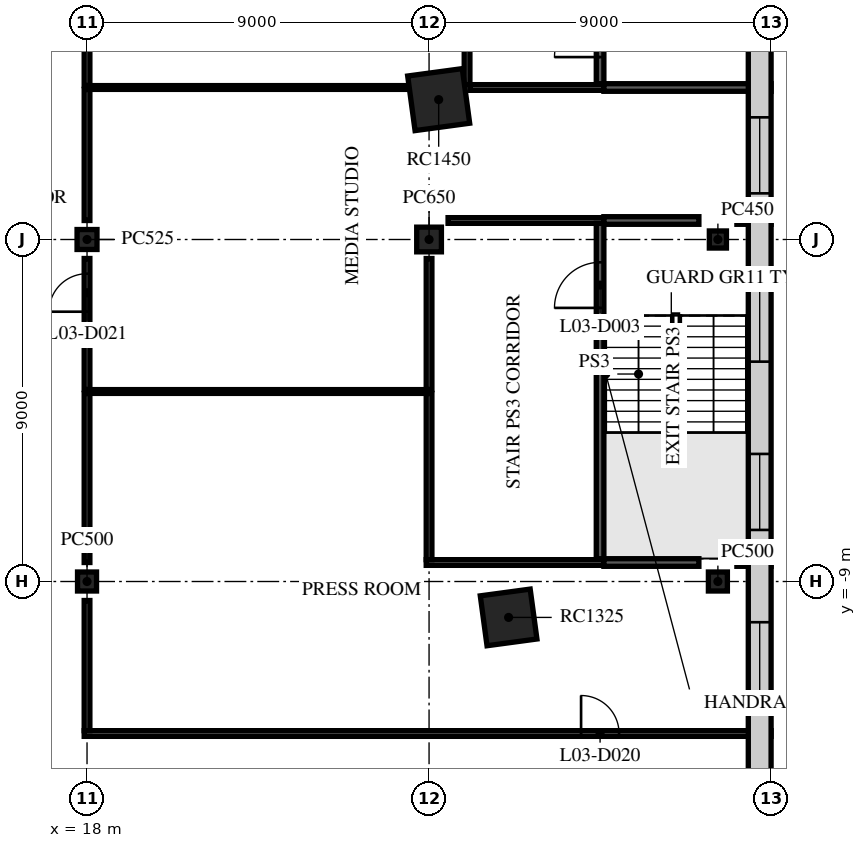
"""IFC4 building model, lengths in metres.
Left out: names, types, materials, properties, quantities, classifications, styles, units other than length and angle.
Written with IfcOpenShell. Run it as: python <this file> out.ifc"""

import sys

from ifc_helpers import new_model, si_unit, direction, frame, frame_2d, origin, origin_2d, place, context, subcontext, project, spatial, rectangle, extrude, element, fill, save


model = new_model("IFC4")
c1 = context("Model", 3, precision=1e-05, world=origin(), true_north=direction((0.0, 1.0)))
c2 = subcontext(c1, "Body", "Model", "MODEL_VIEW")
j1 = project(units=[si_unit("LENGTHUNIT", "METRE"), si_unit("PLANEANGLEUNIT", "RADIAN")], contexts=[c1])
p1 = place(None, origin())
s1 = spatial("IfcSite", under=j1, at=p1, CompositionType="ELEMENT")
p2 = place(p1, origin())
s2 = spatial("IfcBuilding", under=s1, at=p2, CompositionType="ELEMENT")
p3 = place(p2, frame((0.0, 0.0, 13.5)))
s3 = spatial("IfcBuildingStorey", under=s2, at=p3, CompositionType="ELEMENT", Elevation=13.5)
p4 = place(p3, frame((18.0, -9.0, 0.0), z_axis=(0.0, 0.0, 1.0), x_axis=(1.0, 0.0, 0.0)))
e1 = element("IfcColumn", 1, at=p4, inside=s3, PredefinedType="COLUMN", context=c2, shape_type="SweptSolid", body=[
    extrude(rectangle(XDim=0.5, YDim=0.5, at=origin_2d()), origin(), (0.0, 0.0, 1.0), 4.5),
])
p5 = place(p3, frame((18.0, 0.0, 0.0), z_axis=(0.0, 0.0, 1.0), x_axis=(1.0, 0.0, 0.0)))
e2 = element("IfcColumn", 2, at=p5, inside=s3, PredefinedType="COLUMN", context=c2, shape_type="SweptSolid", body=[
    extrude(rectangle(XDim=0.525, YDim=0.525, at=origin_2d()), origin(), (0.0, 0.0, 1.0), 4.5),
])
p6 = place(p3, frame((27.0, 0.0, 0.0), z_axis=(0.0, 0.0, 1.0), x_axis=(1.0, 0.0, 0.0)))
e3 = element("IfcColumn", 3, at=p6, inside=s3, PredefinedType="COLUMN", context=c2, shape_type="SweptSolid", body=[
    extrude(rectangle(XDim=0.65, YDim=0.65, at=origin_2d()), origin(), (0.0, 0.0, 1.0), 4.5),
])
p7 = place(p3, frame((34.6, -9.0, 0.0), z_axis=(0.0, 0.0, 1.0), x_axis=(1.0, 0.0, 0.0)))
e4 = element("IfcColumn", 4, at=p7, inside=s3, PredefinedType="COLUMN", context=c2, shape_type="SweptSolid", body=[
    extrude(rectangle(XDim=0.5, YDim=0.5, at=origin_2d()), origin(), (0.0, 0.0, 1.0), 4.5),
])
p8 = place(p3, frame((34.6, 0.0, 0.0), z_axis=(0.0, 0.0, 1.0), x_axis=(1.0, 0.0, 0.0)))
e5 = element("IfcColumn", 5, at=p8, inside=s3, PredefinedType="COLUMN", context=c2, shape_type="SweptSolid", body=[
    extrude(rectangle(XDim=0.45, YDim=0.45, at=origin_2d()), origin(), (0.0, 0.0, 1.0), 4.5),
])
p9 = place(p3, frame((29.093, -9.945, 0.0), z_axis=(0.0, 0.0, 1.0), x_axis=(0.991001197216, 0.133853005627, 0.0)))
e6 = element("IfcColumn", 6, at=p9, inside=s3, PredefinedType="COLUMN", context=c2, shape_type="SweptSolid", body=[
    extrude(rectangle(XDim=1.325, YDim=1.325, at=origin_2d()), origin(), (0.0, 0.0, 1.0), 4.5),
])
p10 = place(p3, frame((27.253, 3.681, 0.0), z_axis=(0.0, 0.0, 1.0), x_axis=(0.991001197216, 0.133853005627, 0.0)))
e7 = element("IfcColumn", 7, at=p10, inside=s3, PredefinedType="COLUMN", context=c2, shape_type="SweptSolid", body=[
    extrude(rectangle(XDim=1.45, YDim=1.45, at=origin_2d()), origin(), (0.0, 0.0, 1.0), 4.5),
])
p11 = place(p3, frame((17.925, -13.0, 0.0), z_axis=(0.0, 0.0, 1.0), x_axis=(1.0, 0.0, 0.0)))
e8 = element("IfcWall", 8, at=p11, inside=s3, PredefinedType="PARTITIONING", context=c2, shape_type="SweptSolid", body=[
    extrude(rectangle(XDim=18.075, YDim=0.15, at=frame_2d((9.038, 0.0))), origin(), (0.0, 0.0, 1.0), 4.1),
])
p12 = place(p11, frame((13.075, 0.0, 0.0)))
e9 = element("IfcOpeningElement", 9, at=p12, cuts=e8, PredefinedType="OPENING", context=c2, shape_type="SweptSolid", body=[
    extrude(rectangle(XDim=1.0, YDim=2.1, at=frame_2d((0.5, 1.05))), frame((0.0, 0.085, 0.0), z_axis=(0.0, -1.0, 0.0), x_axis=(1.0, 0.0, 0.0)), (0.0, 0.0, 1.0), 0.17),
])
p13 = place(p3, frame((26.925, -8.5, 0.0), z_axis=(0.0, 0.0, 1.0), x_axis=(1.0, 0.0, 0.0)))
e10 = element("IfcWall", 10, at=p13, inside=s3, PredefinedType="PARTITIONING", context=c2, shape_type="SweptSolid", body=[
    extrude(rectangle(XDim=4.675, YDim=0.15, at=frame_2d((2.337, 0.0))), origin(), (0.0, 0.0, 1.0), 4.1),
])
p14 = place(p3, frame((31.6, -8.5, 0.0), z_axis=(0.0, 0.0, 1.0), x_axis=(1.0, 0.0, 0.0)))
e11 = element("IfcWall", 11, at=p14, inside=s3, PredefinedType="PARTITIONING", context=c2, shape_type="SweptSolid", body=[
    extrude(rectangle(XDim=2.5, YDim=0.2, at=frame_2d((1.25, 0.0))), origin(), (0.0, 0.0, 1.0), 4.1),
])
p15 = place(p3, frame((35.1, -8.5, 0.0), z_axis=(0.0, 0.0, 1.0), x_axis=(1.0, 0.0, 0.0)))
e12 = element("IfcWall", 12, at=p15, inside=s3, PredefinedType="PARTITIONING", context=c2, shape_type="SweptSolid", body=[
    extrude(rectangle(XDim=0.9, YDim=0.2, at=frame_2d((0.45, 0.0))), origin(), (0.0, 0.0, 1.0), 4.1),
])
p16 = place(p3, frame((18.075, -4.0, 0.0), z_axis=(0.0, 0.0, 1.0), x_axis=(1.0, 0.0, 0.0)))
e13 = element("IfcWall", 13, at=p16, inside=s3, PredefinedType="PARTITIONING", context=c2, shape_type="SweptSolid", body=[
    extrude(rectangle(XDim=8.85, YDim=0.1, at=frame_2d((4.425, 0.0))), origin(), (0.0, 0.0, 1.0), 4.1),
])
p17 = place(p3, frame((27.5, 0.5, 0.0), z_axis=(0.0, 0.0, 1.0), x_axis=(1.0, 0.0, 0.0)))
e14 = element("IfcWall", 14, at=p17, inside=s3, PredefinedType="PARTITIONING", context=c2, shape_type="SweptSolid", body=[
    extrude(rectangle(XDim=4.1, YDim=0.15, at=frame_2d((2.05, 0.0))), origin(), (0.0, 0.0, 1.0), 4.1),
])
p18 = place(p3, frame((31.6, 0.5, 0.0), z_axis=(0.0, 0.0, 1.0), x_axis=(1.0, 0.0, 0.0)))
e15 = element("IfcWall", 15, at=p18, inside=s3, PredefinedType="PARTITIONING", context=c2, shape_type="SweptSolid", body=[
    extrude(rectangle(XDim=2.5, YDim=0.2, at=frame_2d((1.25, 0.0))), origin(), (0.0, 0.0, 1.0), 4.1),
])
p19 = place(p3, frame((35.1, 0.5, 0.0), z_axis=(0.0, 0.0, 1.0), x_axis=(1.0, 0.0, 0.0)))
e16 = element("IfcWall", 16, at=p19, inside=s3, PredefinedType="PARTITIONING", context=c2, shape_type="SweptSolid", body=[
    extrude(rectangle(XDim=0.9, YDim=0.2, at=frame_2d((0.45, 0.0))), origin(), (0.0, 0.0, 1.0), 4.1),
])
p20 = place(p3, frame((18.075, 4.0, 0.0), z_axis=(0.0, 0.0, 1.0), x_axis=(1.0, 0.0, 0.0)))
e17 = element("IfcWall", 17, at=p20, inside=s3, PredefinedType="PARTITIONING", context=c2, shape_type="SweptSolid", body=[
    extrude(rectangle(XDim=8.447, YDim=0.1, at=frame_2d((4.223, 0.0))), origin(), (0.0, 0.0, 1.0), 4.1),
])
p21 = place(p3, frame((28.075, 4.0, 0.0), z_axis=(0.0, 0.0, 1.0), x_axis=(1.0, 0.0, 0.0)))
e18 = element("IfcWall", 18, at=p21, inside=s3, PredefinedType="PARTITIONING", context=c2, shape_type="SweptSolid", body=[
    extrude(rectangle(XDim=3.525, YDim=0.15, at=frame_2d((1.763, 0.0))), origin(), (0.0, 0.0, 1.0), 4.1),
])
p22 = place(p3, frame((31.6, 4.0, 0.0), z_axis=(0.0, 0.0, 1.0), x_axis=(1.0, 0.0, 0.0)))
e19 = element("IfcWall", 19, at=p22, inside=s3, PredefinedType="PARTITIONING", context=c2, shape_type="SweptSolid", body=[
    extrude(rectangle(XDim=4.4, YDim=0.2, at=frame_2d((2.2, 0.0))), origin(), (0.0, 0.0, 1.0), 4.1),
])
p23 = place(p3, frame((18.0, -12.925, 0.0), z_axis=(0.0, 0.0, 1.0), x_axis=(0.0, 1.0, 0.0)))
e20 = element("IfcWall", 20, at=p23, inside=s3, PredefinedType="PARTITIONING", context=c2, shape_type="SweptSolid", body=[
    extrude(rectangle(XDim=3.425, YDim=0.15, at=frame_2d((1.712, 0.0))), origin(), (0.0, 0.0, 1.0), 4.1),
])
p24 = place(p3, frame((18.0, -8.5, 0.0), z_axis=(0.0, 0.0, 1.0), x_axis=(0.0, 1.0, 0.0)))
e21 = element("IfcWall", 21, at=p24, inside=s3, PredefinedType="PARTITIONING", context=c2, shape_type="SweptSolid", body=[
    extrude(rectangle(XDim=4.45, YDim=0.15, at=frame_2d((2.225, 0.0))), origin(), (0.0, 0.0, 1.0), 4.1),
])
p25 = place(p3, frame((18.0, -3.95, 0.0), z_axis=(0.0, 0.0, 1.0), x_axis=(0.0, 1.0, 0.0)))
e22 = element("IfcWall", 22, at=p25, inside=s3, PredefinedType="PARTITIONING", context=c2, shape_type="SweptSolid", body=[
    extrude(rectangle(XDim=3.45, YDim=0.15, at=frame_2d((1.725, 0.0))), origin(), (0.0, 0.0, 1.0), 4.1),
])
p26 = place(p25, frame((2.05, 0.0, 0.0)))
e23 = element("IfcOpeningElement", 23, at=p26, cuts=e22, PredefinedType="OPENING", context=c2, shape_type="SweptSolid", body=[
    extrude(rectangle(XDim=1.0, YDim=2.1, at=frame_2d((0.5, 1.05))), frame((0.0, 0.085, 0.0), z_axis=(0.0, -1.0, 0.0), x_axis=(1.0, 0.0, 0.0)), (0.0, 0.0, 1.0), 0.17),
])
p27 = place(p3, frame((18.0, 0.5, 0.0), z_axis=(0.0, 0.0, 1.0), x_axis=(0.0, 1.0, 0.0)))
e24 = element("IfcWall", 24, at=p27, inside=s3, PredefinedType="PARTITIONING", context=c2, shape_type="SweptSolid", body=[
    extrude(rectangle(XDim=3.45, YDim=0.15, at=frame_2d((1.725, 0.0))), origin(), (0.0, 0.0, 1.0), 4.1),
])
p28 = place(p3, frame((18.0, 4.05, 0.0), z_axis=(0.0, 0.0, 1.0), x_axis=(0.0, 1.0, 0.0)))
e25 = element("IfcWall", 25, at=p28, inside=s3, PredefinedType="PARTITIONING", context=c2, shape_type="SweptSolid", body=[
    extrude(rectangle(XDim=4.45, YDim=0.15, at=frame_2d((2.225, 0.0))), origin(), (0.0, 0.0, 1.0), 4.1),
])
p29 = place(p3, frame((27.0, -8.425, 0.0), z_axis=(0.0, 0.0, 1.0), x_axis=(0.0, 1.0, 0.0)))
e26 = element("IfcWall", 26, at=p29, inside=s3, PredefinedType="PARTITIONING", context=c2, shape_type="SweptSolid", body=[
    extrude(rectangle(XDim=4.375, YDim=0.15, at=frame_2d((2.188, 0.0))), origin(), (0.0, 0.0, 1.0), 4.1),
])
p30 = place(p3, frame((27.0, -3.95, 0.0), z_axis=(0.0, 0.0, 1.0), x_axis=(0.0, 1.0, 0.0)))
e27 = element("IfcWall", 27, at=p30, inside=s3, PredefinedType="PARTITIONING", context=c2, shape_type="SweptSolid", body=[
    extrude(rectangle(XDim=3.45, YDim=0.15, at=frame_2d((1.725, 0.0))), origin(), (0.0, 0.0, 1.0), 4.1),
])
p31 = place(p3, frame((28.0, 4.075, 0.0), z_axis=(0.0, 0.0, 1.0), x_axis=(0.0, 1.0, 0.0)))
e28 = element("IfcWall", 28, at=p31, inside=s3, PredefinedType="PARTITIONING", context=c2, shape_type="SweptSolid", body=[
    extrude(rectangle(XDim=8.85, YDim=0.15, at=frame_2d((4.425, 0.0))), origin(), (0.0, 0.0, 1.0), 4.1),
])
p32 = place(p3, frame((31.5, -8.4, 0.0), z_axis=(0.0, 0.0, 1.0), x_axis=(0.0, 1.0, 0.0)))
e29 = element("IfcWall", 29, at=p32, inside=s3, PredefinedType="PARTITIONING", context=c2, shape_type="SweptSolid", body=[
    extrude(rectangle(XDim=8.825, YDim=0.2, at=frame_2d((4.413, 0.0))), origin(), (0.0, 0.0, 1.0), 4.1),
])
p33 = place(p32, frame((6.6, 0.0, 0.0)))
e30 = element("IfcOpeningElement", 30, at=p33, cuts=e29, PredefinedType="OPENING", context=c2, shape_type="SweptSolid", body=[
    extrude(rectangle(XDim=1.2, YDim=2.1, at=frame_2d((0.6, 1.05))), frame((0.0, 0.11, 0.0), z_axis=(0.0, -1.0, 0.0), x_axis=(1.0, 0.0, 0.0)), (0.0, 0.0, 1.0), 0.22),
])
p34 = place(p3, frame((31.5, 4.1, 0.0), z_axis=(0.0, 0.0, 1.0), x_axis=(0.0, 1.0, 0.0)))
e31 = element("IfcWall", 31, at=p34, inside=s3, PredefinedType="PARTITIONING", context=c2, shape_type="SweptSolid", body=[
    extrude(rectangle(XDim=8.8, YDim=0.2, at=frame_2d((4.4, 0.0))), origin(), (0.0, 0.0, 1.0), 4.1),
])
p35 = place(p34, frame((0.7, 0.0, 0.0)))
e32 = element("IfcOpeningElement", 32, at=p35, cuts=e31, PredefinedType="OPENING", context=c2, shape_type="SweptSolid", body=[
    extrude(rectangle(XDim=1.2, YDim=2.1, at=frame_2d((0.6, 1.05))), frame((0.0, 0.11, 0.0), z_axis=(0.0, -1.0, 0.0), x_axis=(1.0, 0.0, 0.0)), (0.0, 0.0, 1.0), 0.22),
])
p36 = place(p3, frame((35.7, -30.876, 0.0), z_axis=(0.0, 0.0, 1.0), x_axis=(0.0, 1.0, 0.0)))
e33 = element("IfcWall", 33, at=p36, inside=s3, PredefinedType="STANDARD", context=c2, shape_type="SweptSolid", body=[
    extrude(rectangle(XDim=61.751, YDim=0.6, at=frame_2d((30.876, 0.0))), origin(), (0.0, 0.0, 1.0), 4.1),
])
p37 = place(p36, frame((1.152, 0.0, 0.9)))
e34 = element("IfcOpeningElement", 34, at=p37, cuts=e33, PredefinedType="OPENING", context=c2, shape_type="SweptSolid", body=[
    extrude(rectangle(XDim=2.0, YDim=3.0, at=frame_2d((1.0, 1.5))), frame((0.0, 0.31, 0.0), z_axis=(0.0, -1.0, 0.0), x_axis=(1.0, 0.0, 0.0)), (0.0, 0.0, 1.0), 0.62),
])
p38 = place(p36, frame((5.519, 0.0, 0.9)))
e35 = element("IfcOpeningElement", 35, at=p38, cuts=e33, PredefinedType="OPENING", context=c2, shape_type="SweptSolid", body=[
    extrude(rectangle(XDim=2.0, YDim=3.0, at=frame_2d((1.0, 1.5))), frame((0.0, 0.31, 0.0), z_axis=(0.0, -1.0, 0.0), x_axis=(1.0, 0.0, 0.0)), (0.0, 0.0, 1.0), 0.62),
])
p39 = place(p36, frame((9.947, 0.0, 0.9)))
e36 = element("IfcOpeningElement", 36, at=p39, cuts=e33, PredefinedType="OPENING", context=c2, shape_type="SweptSolid", body=[
    extrude(rectangle(XDim=2.0, YDim=3.0, at=frame_2d((1.0, 1.5))), frame((0.0, 0.31, 0.0), z_axis=(0.0, -1.0, 0.0), x_axis=(1.0, 0.0, 0.0)), (0.0, 0.0, 1.0), 0.62),
])
p40 = place(p36, frame((14.376, 0.0, 0.9)))
e37 = element("IfcOpeningElement", 37, at=p40, cuts=e33, PredefinedType="OPENING", context=c2, shape_type="SweptSolid", body=[
    extrude(rectangle(XDim=2.0, YDim=3.0, at=frame_2d((1.0, 1.5))), frame((0.0, 0.31, 0.0), z_axis=(0.0, -1.0, 0.0), x_axis=(1.0, 0.0, 0.0)), (0.0, 0.0, 1.0), 0.62),
])
p41 = place(p36, frame((18.804, 0.0, 0.9)))
e38 = element("IfcOpeningElement", 38, at=p41, cuts=e33, PredefinedType="OPENING", context=c2, shape_type="SweptSolid", body=[
    extrude(rectangle(XDim=2.0, YDim=3.0, at=frame_2d((1.0, 1.5))), frame((0.0, 0.31, 0.0), z_axis=(0.0, -1.0, 0.0), x_axis=(1.0, 0.0, 0.0)), (0.0, 0.0, 1.0), 0.62),
])
p42 = place(p36, frame((23.233, 0.0, 0.9)))
e39 = element("IfcOpeningElement", 39, at=p42, cuts=e33, PredefinedType="OPENING", context=c2, shape_type="SweptSolid", body=[
    extrude(rectangle(XDim=2.0, YDim=3.0, at=frame_2d((1.0, 1.5))), frame((0.0, 0.31, 0.0), z_axis=(0.0, -1.0, 0.0), x_axis=(1.0, 0.0, 0.0)), (0.0, 0.0, 1.0), 0.62),
])
p43 = place(p36, frame((27.662, 0.0, 0.9)))
e40 = element("IfcOpeningElement", 40, at=p43, cuts=e33, PredefinedType="OPENING", context=c2, shape_type="SweptSolid", body=[
    extrude(rectangle(XDim=2.0, YDim=3.0, at=frame_2d((1.0, 1.5))), frame((0.0, 0.31, 0.0), z_axis=(0.0, -1.0, 0.0), x_axis=(1.0, 0.0, 0.0)), (0.0, 0.0, 1.0), 0.62),
])
p44 = place(p36, frame((32.09, 0.0, 0.9)))
e41 = element("IfcOpeningElement", 41, at=p44, cuts=e33, PredefinedType="OPENING", context=c2, shape_type="SweptSolid", body=[
    extrude(rectangle(XDim=2.0, YDim=3.0, at=frame_2d((1.0, 1.5))), frame((0.0, 0.31, 0.0), z_axis=(0.0, -1.0, 0.0), x_axis=(1.0, 0.0, 0.0)), (0.0, 0.0, 1.0), 0.62),
])
p45 = place(p36, frame((36.519, 0.0, 0.9)))
e42 = element("IfcOpeningElement", 42, at=p45, cuts=e33, PredefinedType="OPENING", context=c2, shape_type="SweptSolid", body=[
    extrude(rectangle(XDim=2.0, YDim=3.0, at=frame_2d((1.0, 1.5))), frame((0.0, 0.31, 0.0), z_axis=(0.0, -1.0, 0.0), x_axis=(1.0, 0.0, 0.0)), (0.0, 0.0, 1.0), 0.62),
])
p46 = place(p36, frame((45.376, 0.0, 0.9)))
e43 = element("IfcOpeningElement", 43, at=p46, cuts=e33, PredefinedType="OPENING", context=c2, shape_type="SweptSolid", body=[
    extrude(rectangle(XDim=2.0, YDim=3.0, at=frame_2d((1.0, 1.5))), frame((0.0, 0.31, 0.0), z_axis=(0.0, -1.0, 0.0), x_axis=(1.0, 0.0, 0.0)), (0.0, 0.0, 1.0), 0.62),
])
p47 = place(p36, frame((49.804, 0.0, 0.9)))
e44 = element("IfcOpeningElement", 44, at=p47, cuts=e33, PredefinedType="OPENING", context=c2, shape_type="SweptSolid", body=[
    extrude(rectangle(XDim=2.0, YDim=3.0, at=frame_2d((1.0, 1.5))), frame((0.0, 0.31, 0.0), z_axis=(0.0, -1.0, 0.0), x_axis=(1.0, 0.0, 0.0)), (0.0, 0.0, 1.0), 0.62),
])
p48 = place(p36, frame((58.599, 0.0, 0.9)))
e45 = element("IfcOpeningElement", 45, at=p48, cuts=e33, PredefinedType="OPENING", context=c2, shape_type="SweptSolid", body=[
    extrude(rectangle(XDim=2.0, YDim=3.0, at=frame_2d((1.0, 1.5))), frame((0.0, 0.31, 0.0), z_axis=(0.0, -1.0, 0.0), x_axis=(1.0, 0.0, 0.0)), (0.0, 0.0, 1.0), 0.62),
])
p49 = place(p33, frame((1.2, 0.0, 0.0), z_axis=(0.0, 0.0, 1.0), x_axis=(-1.0, 0.0, 0.0)))
e46 = element("IfcDoor", 46, at=p49, inside=s3, OperationType="SINGLE_SWING_LEFT", PredefinedType="DOOR", context=c2, shape_type="SweptSolid", body=[
    extrude(rectangle(XDim=1.2, YDim=2.1, at=frame_2d((0.6, 1.05))), frame((0.0, 0.025, 0.0), z_axis=(0.0, -1.0, 0.0), x_axis=(1.0, 0.0, 0.0)), (0.0, 0.0, 1.0), 0.05),
])
fill(e30, e46)
p50 = place(p35, frame((1.2, 0.0, 0.0), z_axis=(0.0, 0.0, 1.0), x_axis=(-1.0, 0.0, 0.0)))
e47 = element("IfcDoor", 47, at=p50, inside=s3, OperationType="SINGLE_SWING_RIGHT", PredefinedType="DOOR", context=c2, shape_type="SweptSolid", body=[
    extrude(rectangle(XDim=1.2, YDim=2.1, at=frame_2d((0.6, 1.05))), frame((0.0, 0.025, 0.0), z_axis=(0.0, -1.0, 0.0), x_axis=(1.0, 0.0, 0.0)), (0.0, 0.0, 1.0), 0.05),
])
fill(e32, e47)
p51 = place(p12, origin())
e48 = element("IfcDoor", 48, at=p51, inside=s3, OperationType="SINGLE_SWING_RIGHT", PredefinedType="DOOR", context=c2, shape_type="SweptSolid", body=[
    extrude(rectangle(XDim=1.0, YDim=2.1, at=frame_2d((0.5, 1.05))), frame((0.0, 0.025, 0.0), z_axis=(0.0, -1.0, 0.0), x_axis=(1.0, 0.0, 0.0)), (0.0, 0.0, 1.0), 0.05),
])
fill(e9, e48)
p52 = place(p26, origin())
e49 = element("IfcDoor", 49, at=p52, inside=s3, OperationType="SINGLE_SWING_LEFT", PredefinedType="DOOR", context=c2, shape_type="SweptSolid", body=[
    extrude(rectangle(XDim=1.0, YDim=2.1, at=frame_2d((0.5, 1.05))), frame((0.0, 0.025, 0.0), z_axis=(0.0, -1.0, 0.0), x_axis=(1.0, 0.0, 0.0)), (0.0, 0.0, 1.0), 0.05),
])
fill(e23, e49)
p53 = place(p41, origin())
e50 = element("IfcWindow", 50, at=p53, inside=s3, PartitioningType="SINGLE_PANEL", PredefinedType="WINDOW", context=c2, shape_type="SweptSolid", body=[
    extrude(rectangle(XDim=2.0, YDim=3.0, at=frame_2d((1.0, 1.5))), frame((0.0, 0.03, 0.0), z_axis=(0.0, -1.0, 0.0), x_axis=(1.0, 0.0, 0.0)), (0.0, 0.0, 1.0), 0.06),
])
fill(e38, e50)
p54 = place(p42, origin())
e51 = element("IfcWindow", 51, at=p54, inside=s3, PartitioningType="SINGLE_PANEL", PredefinedType="WINDOW", context=c2, shape_type="SweptSolid", body=[
    extrude(rectangle(XDim=2.0, YDim=3.0, at=frame_2d((1.0, 1.5))), frame((0.0, 0.03, 0.0), z_axis=(0.0, -1.0, 0.0), x_axis=(1.0, 0.0, 0.0)), (0.0, 0.0, 1.0), 0.06),
])
fill(e39, e51)
p55 = place(p43, origin())
e52 = element("IfcWindow", 52, at=p55, inside=s3, PartitioningType="SINGLE_PANEL", PredefinedType="WINDOW", context=c2, shape_type="SweptSolid", body=[
    extrude(rectangle(XDim=2.0, YDim=3.0, at=frame_2d((1.0, 1.5))), frame((0.0, 0.03, 0.0), z_axis=(0.0, -1.0, 0.0), x_axis=(1.0, 0.0, 0.0)), (0.0, 0.0, 1.0), 0.06),
])
fill(e40, e52)
p56 = place(p44, origin())
e53 = element("IfcWindow", 53, at=p56, inside=s3, PartitioningType="SINGLE_PANEL", PredefinedType="WINDOW", context=c2, shape_type="SweptSolid", body=[
    extrude(rectangle(XDim=2.0, YDim=3.0, at=frame_2d((1.0, 1.5))), frame((0.0, 0.03, 0.0), z_axis=(0.0, -1.0, 0.0), x_axis=(1.0, 0.0, 0.0)), (0.0, 0.0, 1.0), 0.06),
])
fill(e41, e53)
save(model, sys.argv[1])
